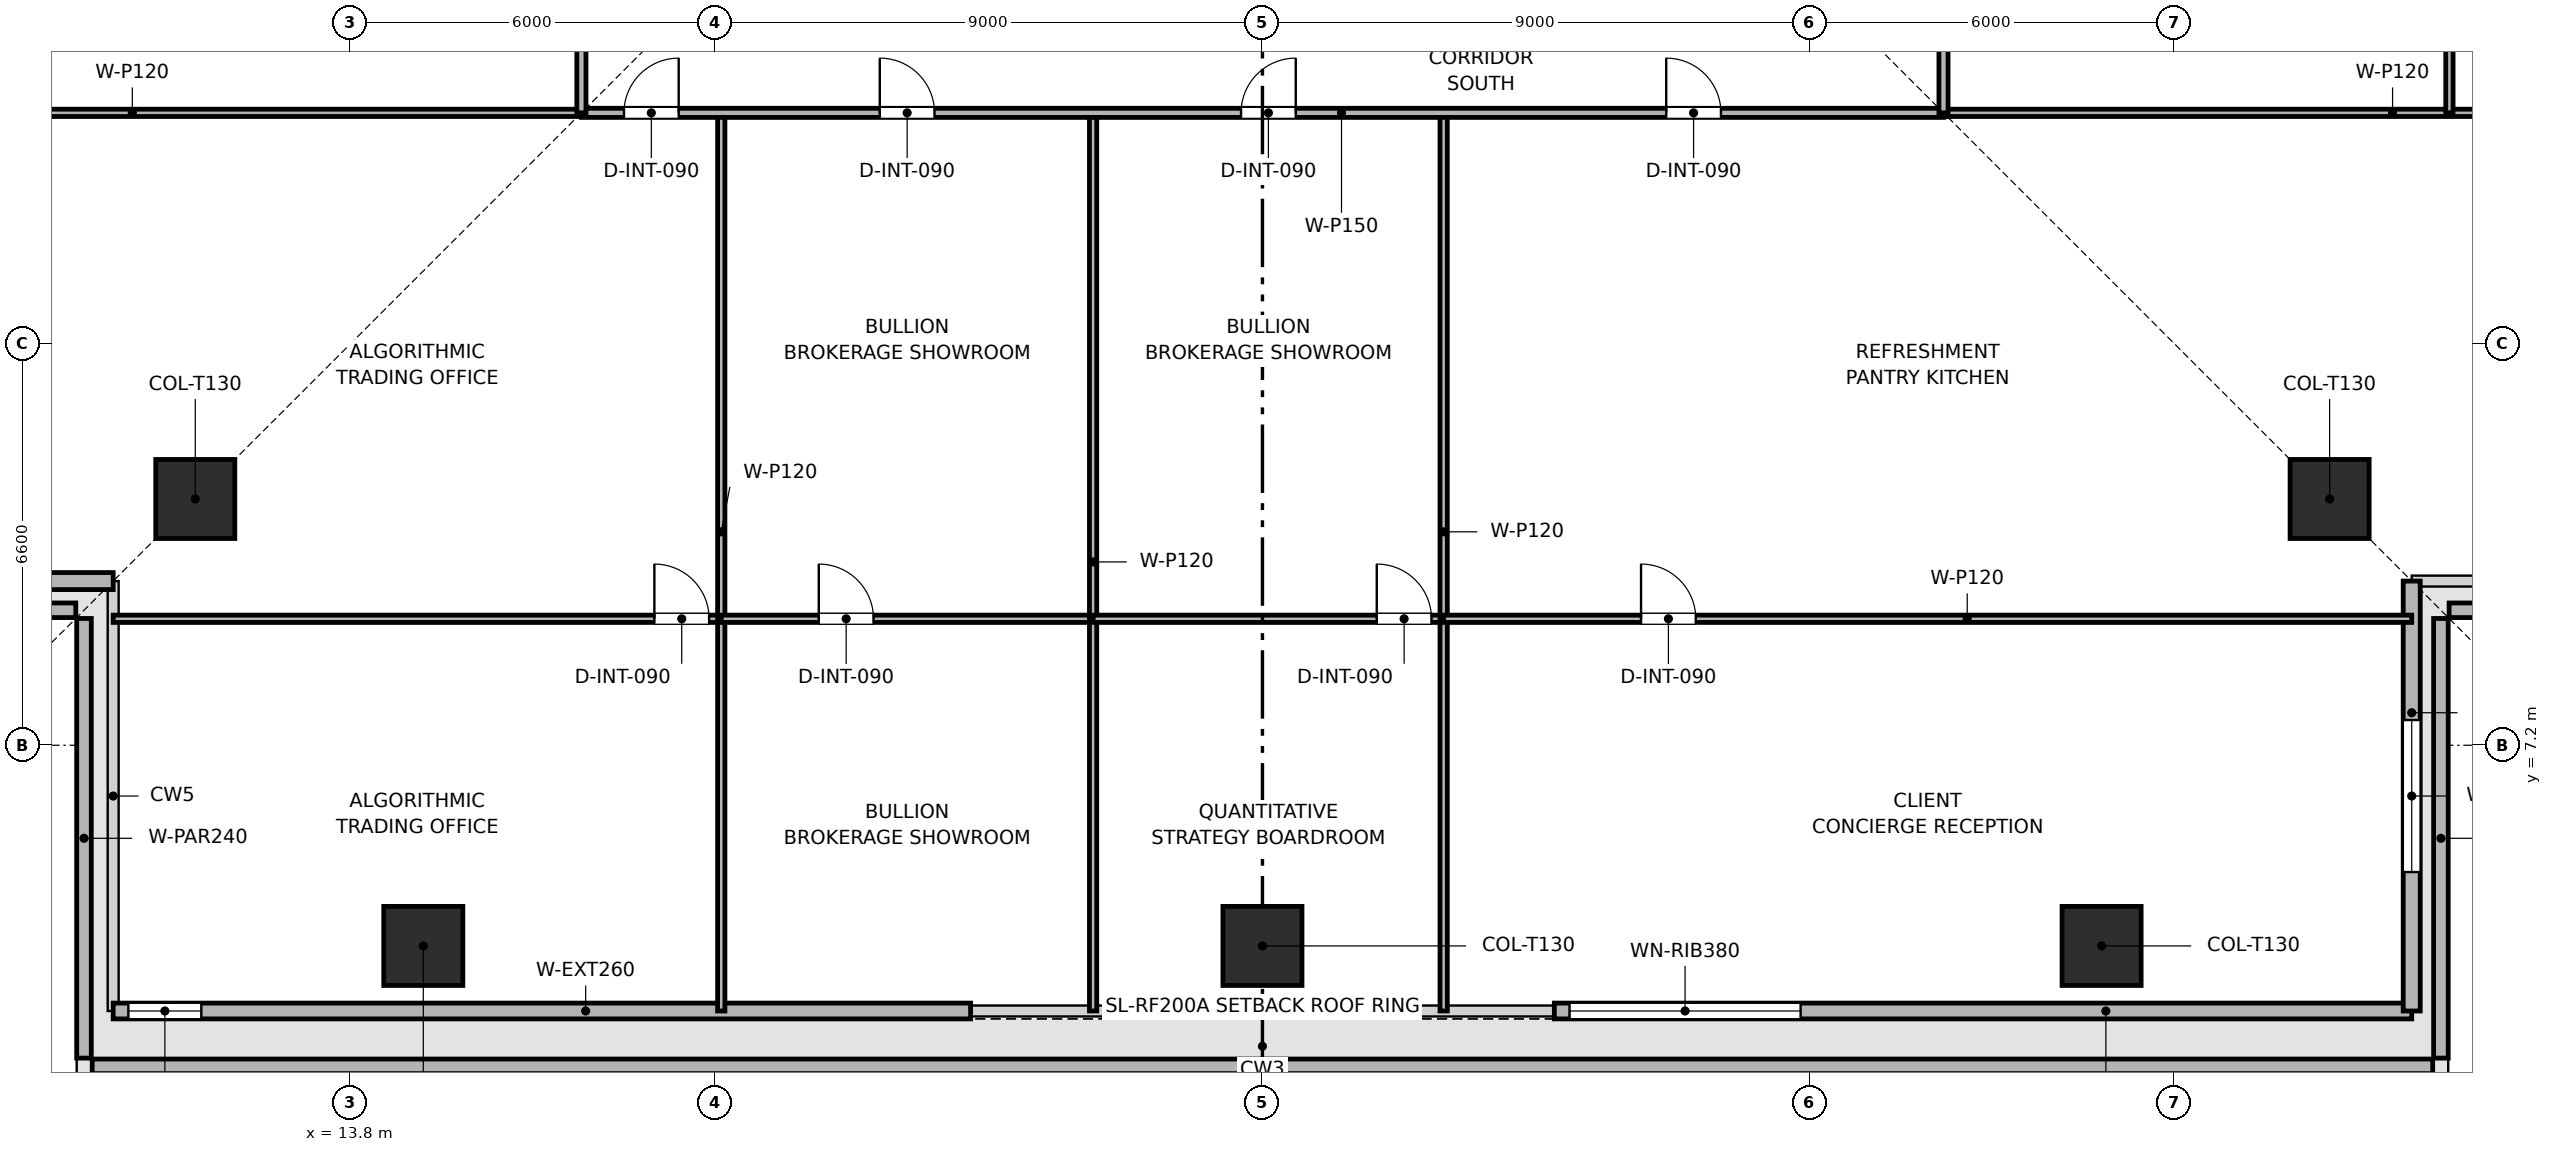
"""IFC4 building model, lengths in metres.
Left out: names, types, materials, properties, quantities, classifications, styles, units other than length and angle.
Written with IfcOpenShell. Run it as: python <this file> out.ifc"""

import sys

from ifc_helpers import new_model, si_unit, direction, frame, frame_2d, origin, origin_2d, place, context, subcontext, project, spatial, rectangle, extrude, element, fill, save


model = new_model("IFC4")
c1 = context("Model", 3, precision=1e-05, world=origin(), true_north=direction((0.0, 1.0)))
c2 = subcontext(c1, "Body", "Model", "MODEL_VIEW")
j1 = project(units=[si_unit("LENGTHUNIT", "METRE"), si_unit("PLANEANGLEUNIT", "RADIAN")], contexts=[c1])
p1 = place(None, origin())
s1 = spatial("IfcSite", under=j1, at=p1, CompositionType="ELEMENT")
p2 = place(p1, origin())
s2 = spatial("IfcBuilding", under=s1, at=p2, CompositionType="ELEMENT")
p3 = place(p2, frame((0.0, 0.0, 113.4)))
s3 = spatial("IfcBuildingStorey", under=s2, at=p3, CompositionType="ELEMENT", Elevation=113.4)
for number, where, z_axis, x_axis in (
    (1, (15.0, 3.9, 0.003), (0.0, 0.0, 1.0), (1.0, 0.0, 0.0)),
    (2, (28.8, 3.9, 0.003), (0.0, 0.0, 1.0), (1.0, 0.0, 0.0)),
    (3, (42.6, 3.9, 0.003), (0.0, 0.0, 1.0), (1.0, 0.0, 0.0)),
    (4, (11.25, 11.25, 0.003), (0.0, 0.0, 1.0), (1.0, 0.0, 0.0)),
    (5, (46.35, 11.25, 0.003), (0.0, 0.0, 1.0), (1.0, 0.0, 0.0)),
):
    element("IfcColumn", number, at=place(p3, frame(where, z_axis=z_axis, x_axis=x_axis)), inside=s3, PredefinedType="COLUMN", context=c2, shape_type="SweptSolid", body=[
        extrude(rectangle(XDim=1.3, YDim=1.3, at=origin_2d()), origin(), (0.0, 0.0, 1.0), 3.644),
    ])
p4 = place(p3, frame((9.555, 1.92, 0.0), z_axis=(0.0, 0.0, 1.0), x_axis=(1.0, 0.0, 0.0)))
e6 = element("IfcWall", 6, at=p4, inside=s3, PredefinedType="PARAPET", context=c2, shape_type="SweptSolid", body=[
    extrude(rectangle(XDim=38.49, YDim=0.24, at=frame_2d((19.245, 0.0))), origin(), (0.0, 0.0, 1.0), 1.2),
])
for number, where, z_axis, x_axis in (
    (7, (48.18, 2.055, 0.0), (0.0, 0.0, 1.0), (0.0, 1.0, 0.0)),
    (8, (48.315, 9.42, 0.0), (0.0, 0.0, 1.0), (1.0, 0.0, 0.0)),
    (9, (2.055, 9.42, 0.0), (0.0, 0.0, 1.0), (1.0, 0.0, 0.0)),
    (10, (9.42, 9.285, 0.0), (0.0, 0.0, 1.0), (0.0, -1.0, 0.0)),
):
    element("IfcWall", number, at=place(p3, frame(where, z_axis=z_axis, x_axis=x_axis)), inside=s3, PredefinedType="PARAPET", context=c2, shape_type="SweptSolid", body=[
        extrude(rectangle(XDim=7.23, YDim=0.24, at=frame_2d((3.615, 0.0))), origin(), (0.0, 0.0, 1.0), 1.2),
    ])
p5 = place(p3, frame((47.7, 2.83, 0.0), z_axis=(0.0, 0.0, 1.0), x_axis=(-1.0, 0.0, 0.0)))
e11 = element("IfcWall", 11, at=p5, inside=s3, PredefinedType="SOLIDWALL", context=c2, shape_type="SweptSolid", body=[
    extrude(rectangle(XDim=14.1, YDim=0.26, at=frame_2d((7.05, 0.0))), origin(), (0.0, 0.0, 1.0), 3.65),
])
p6 = place(p5, frame((10.05, 0.0, 0.9)))
e12 = element("IfcOpeningElement", 12, at=p6, cuts=e11, PredefinedType="OPENING", context=c2, shape_type="SweptSolid", body=[
    extrude(rectangle(XDim=3.8, YDim=1.9, at=frame_2d((1.9, 0.95))), frame((0.0, 0.14, 0.0), z_axis=(0.0, -1.0, 0.0), x_axis=(1.0, 0.0, 0.0)), (0.0, 0.0, 1.0), 0.28),
])
p7 = place(p3, frame((24.0, 2.83, 0.0), z_axis=(0.0, 0.0, 1.0), x_axis=(-1.0, 0.0, 0.0)))
e13 = element("IfcWall", 13, at=p7, inside=s3, PredefinedType="SOLIDWALL", context=c2, shape_type="SweptSolid", body=[
    extrude(rectangle(XDim=14.1, YDim=0.26, at=frame_2d((7.05, 0.0))), origin(), (0.0, 0.0, 1.0), 3.65),
])
p8 = place(p7, frame((12.65, 0.0, 0.9)))
e14 = element("IfcOpeningElement", 14, at=p8, cuts=e13, PredefinedType="OPENING", context=c2, shape_type="SweptSolid", body=[
    extrude(rectangle(XDim=1.2, YDim=2.1, at=frame_2d((0.6, 1.05))), frame((0.0, 0.14, 0.0), z_axis=(0.0, -1.0, 0.0), x_axis=(1.0, 0.0, 0.0)), (0.0, 0.0, 1.0), 0.28),
])
p9 = place(p3, frame((9.9, 9.9, 0.0), z_axis=(0.0, 0.0, 1.0), x_axis=(-1.0, 0.0, 0.0)))
e15 = element("IfcWall", 15, at=p9, inside=s3, PredefinedType="SOLIDWALL", context=c2, shape_type="SweptSolid", body=[
    extrude(rectangle(XDim=7.07, YDim=0.28, at=frame_2d((3.535, 0.0))), origin(), (0.0, 0.0, 1.0), 3.65),
])
p10 = place(p9, frame((2.285, 0.0, 0.9)))
e16 = element("IfcOpeningElement", 16, at=p10, cuts=e15, PredefinedType="OPENING", context=c2, shape_type="SweptSolid", body=[
    extrude(rectangle(XDim=2.5, YDim=1.9, at=frame_2d((1.25, 0.95))), frame((0.0, 0.15, 0.0), z_axis=(0.0, -1.0, 0.0), x_axis=(1.0, 0.0, 0.0)), (0.0, 0.0, 1.0), 0.3),
])
p11 = place(p3, frame((47.7, 9.9, 0.0), z_axis=(0.0, 0.0, 1.0), x_axis=(0.0, -1.0, 0.0)))
e17 = element("IfcWall", 17, at=p11, inside=s3, PredefinedType="SOLIDWALL", context=c2, shape_type="SweptSolid", body=[
    extrude(rectangle(XDim=7.07, YDim=0.28, at=frame_2d((3.535, 0.0))), origin(), (0.0, 0.0, 1.0), 3.65),
])
p12 = place(p11, frame((2.285, 0.0, 0.9)))
e18 = element("IfcOpeningElement", 18, at=p12, cuts=e17, PredefinedType="OPENING", context=c2, shape_type="SweptSolid", body=[
    extrude(rectangle(XDim=2.5, YDim=1.9, at=frame_2d((1.25, 0.95))), frame((0.0, 0.15, 0.0), z_axis=(0.0, -1.0, 0.0), x_axis=(1.0, 0.0, 0.0)), (0.0, 0.0, 1.0), 0.3),
])
p13 = place(p3, frame((9.9, 9.28, 0.0), z_axis=(0.0, 0.0, 1.0), x_axis=(1.0, 0.0, 0.0)))
e19 = element("IfcWall", 19, at=p13, inside=s3, PredefinedType="PARTITIONING", context=c2, shape_type="SweptSolid", body=[
    extrude(rectangle(XDim=10.0, YDim=0.12, at=frame_2d((5.0, 0.0))), origin(), (0.0, 0.0, 1.0), 3.035),
])
p14 = place(p13, frame((8.9, 0.0, 0.0)))
e20 = element("IfcOpeningElement", 20, at=p14, cuts=e19, PredefinedType="OPENING", context=c2, shape_type="SweptSolid", body=[
    extrude(rectangle(XDim=0.9, YDim=2.1, at=frame_2d((0.45, 1.05))), frame((0.0, 0.07, 0.0), z_axis=(0.0, -1.0, 0.0), x_axis=(1.0, 0.0, 0.0)), (0.0, 0.0, 1.0), 0.14),
])
p15 = place(p3, frame((19.9, 2.83, 0.0), z_axis=(0.0, 0.0, 1.0), x_axis=(0.0, 1.0, 0.0)))
e21 = element("IfcWall", 21, at=p15, inside=s3, PredefinedType="PARTITIONING", context=c2, shape_type="SweptSolid", body=[
    extrude(rectangle(XDim=14.77, YDim=0.12, at=frame_2d((7.385, 0.0))), origin(), (0.0, 0.0, 1.0), 3.035),
])
p16 = place(p3, frame((19.9, 9.28, 0.0), z_axis=(0.0, 0.0, 1.0), x_axis=(1.0, 0.0, 0.0)))
e22 = element("IfcWall", 22, at=p16, inside=s3, PredefinedType="PARTITIONING", context=c2, shape_type="SweptSolid", body=[
    extrude(rectangle(XDim=6.115, YDim=0.12, at=frame_2d((3.058, 0.0))), origin(), (0.0, 0.0, 1.0), 3.185),
])
p17 = place(p16, frame((1.604, 0.0, 0.0)))
e23 = element("IfcOpeningElement", 23, at=p17, cuts=e22, PredefinedType="OPENING", context=c2, shape_type="SweptSolid", body=[
    extrude(rectangle(XDim=0.9, YDim=2.1, at=frame_2d((0.45, 1.05))), frame((0.0, 0.07, 0.0), z_axis=(0.0, -1.0, 0.0), x_axis=(1.0, 0.0, 0.0)), (0.0, 0.0, 1.0), 0.14),
])
p18 = place(p3, frame((26.015, 2.83, 0.0), z_axis=(0.0, 0.0, 1.0), x_axis=(0.0, 1.0, 0.0)))
e24 = element("IfcWall", 24, at=p18, inside=s3, PredefinedType="PARTITIONING", context=c2, shape_type="SweptSolid", body=[
    extrude(rectangle(XDim=14.77, YDim=0.12, at=frame_2d((7.385, 0.0))), origin(), (0.0, 0.0, 1.0), 3.035),
])
p19 = place(p3, frame((26.015, 9.28, 0.0), z_axis=(0.0, 0.0, 1.0), x_axis=(1.0, 0.0, 0.0)))
e25 = element("IfcWall", 25, at=p19, inside=s3, PredefinedType="PARTITIONING", context=c2, shape_type="SweptSolid", body=[
    extrude(rectangle(XDim=5.765, YDim=0.12, at=frame_2d((2.883, 0.0))), origin(), (0.0, 0.0, 1.0), 3.185),
])
p20 = place(p19, frame((4.665, 0.0, 0.0)))
e26 = element("IfcOpeningElement", 26, at=p20, cuts=e25, PredefinedType="OPENING", context=c2, shape_type="SweptSolid", body=[
    extrude(rectangle(XDim=0.9, YDim=2.1, at=frame_2d((0.45, 1.05))), frame((0.0, 0.07, 0.0), z_axis=(0.0, -1.0, 0.0), x_axis=(1.0, 0.0, 0.0)), (0.0, 0.0, 1.0), 0.14),
])
p21 = place(p3, frame((31.78, 2.83, 0.0), z_axis=(0.0, 0.0, 1.0), x_axis=(0.0, 1.0, 0.0)))
e27 = element("IfcWall", 27, at=p21, inside=s3, PredefinedType="PARTITIONING", context=c2, shape_type="SweptSolid", body=[
    extrude(rectangle(XDim=14.77, YDim=0.12, at=frame_2d((7.385, 0.0))), origin(), (0.0, 0.0, 1.0), 3.035),
])
p22 = place(p3, frame((31.78, 9.28, 0.0), z_axis=(0.0, 0.0, 1.0), x_axis=(1.0, 0.0, 0.0)))
e28 = element("IfcWall", 28, at=p22, inside=s3, PredefinedType="PARTITIONING", context=c2, shape_type="SweptSolid", body=[
    extrude(rectangle(XDim=15.92, YDim=0.12, at=frame_2d((7.96, 0.0))), origin(), (0.0, 0.0, 1.0), 3.035),
])
p23 = place(p22, frame((3.246, 0.0, 0.0)))
e29 = element("IfcOpeningElement", 29, at=p23, cuts=e28, PredefinedType="OPENING", context=c2, shape_type="SweptSolid", body=[
    extrude(rectangle(XDim=0.9, YDim=2.1, at=frame_2d((0.45, 1.05))), frame((0.0, 0.07, 0.0), z_axis=(0.0, -1.0, 0.0), x_axis=(1.0, 0.0, 0.0)), (0.0, 0.0, 1.0), 0.14),
])
for number, where, z_axis, x_axis in (
    (30, (2.83, 17.6, 0.0), (0.0, 0.0, 1.0), (1.0, 0.0, 0.0)),
    (31, (40.0, 17.6, 0.0), (0.0, 0.0, 1.0), (1.0, 0.0, 0.0)),
):
    element("IfcWall", number, at=place(p3, frame(where, z_axis=z_axis, x_axis=x_axis)), inside=s3, PredefinedType="PARTITIONING", context=c2, shape_type="SweptSolid", body=[
        extrude(rectangle(XDim=14.77, YDim=0.12, at=frame_2d((7.385, 0.0))), origin(), (0.0, 0.0, 1.0), 3.035),
    ])
p24 = place(p3, frame((48.32, 17.6, 0.0), z_axis=(0.0, 0.0, 1.0), x_axis=(0.0, 1.0, 0.0)))
e32 = element("IfcWall", 32, at=p24, inside=s3, PredefinedType="PARTITIONING", context=c2, shape_type="SweptSolid", body=[
    extrude(rectangle(XDim=22.4, YDim=0.12, at=frame_2d((11.2, 0.0))), origin(), (0.0, 0.0, 1.0), 3.185),
])
p25 = place(p24, frame((17.783, 0.0, 0.0)))
e33 = element("IfcOpeningElement", 33, at=p25, cuts=e32, PredefinedType="OPENING", context=c2, shape_type="SweptSolid", body=[
    extrude(rectangle(XDim=0.9, YDim=2.1, at=frame_2d((0.45, 1.05))), frame((0.0, 0.07, 0.0), z_axis=(0.0, -1.0, 0.0), x_axis=(1.0, 0.0, 0.0)), (0.0, 0.0, 1.0), 0.14),
])
p26 = place(p3, frame((17.6, 17.6, 0.0), z_axis=(0.0, 0.0, 1.0), x_axis=(1.0, 0.0, 0.0)))
e34 = element("IfcWall", 34, at=p26, inside=s3, PredefinedType="PARTITIONING", context=c2, shape_type="SweptSolid", body=[
    extrude(rectangle(XDim=22.4, YDim=0.15, at=frame_2d((11.2, 0.0))), origin(), (0.0, 0.0, 1.0), 3.185),
])
p27 = place(p26, frame((0.7, 0.0, 0.0)))
e35 = element("IfcOpeningElement", 35, at=p27, cuts=e34, PredefinedType="OPENING", context=c2, shape_type="SweptSolid", body=[
    extrude(rectangle(XDim=0.9, YDim=2.1, at=frame_2d((0.45, 1.05))), frame((0.0, 0.085, 0.0), z_axis=(0.0, -1.0, 0.0), x_axis=(1.0, 0.0, 0.0)), (0.0, 0.0, 1.0), 0.17),
])
p28 = place(p26, frame((4.907, 0.0, 0.0)))
e36 = element("IfcOpeningElement", 36, at=p28, cuts=e34, PredefinedType="OPENING", context=c2, shape_type="SweptSolid", body=[
    extrude(rectangle(XDim=0.9, YDim=2.1, at=frame_2d((0.45, 1.05))), frame((0.0, 0.085, 0.0), z_axis=(0.0, -1.0, 0.0), x_axis=(1.0, 0.0, 0.0)), (0.0, 0.0, 1.0), 0.17),
])
p29 = place(p26, frame((10.848, 0.0, 0.0)))
e37 = element("IfcOpeningElement", 37, at=p29, cuts=e34, PredefinedType="OPENING", context=c2, shape_type="SweptSolid", body=[
    extrude(rectangle(XDim=0.9, YDim=2.1, at=frame_2d((0.45, 1.05))), frame((0.0, 0.085, 0.0), z_axis=(0.0, -1.0, 0.0), x_axis=(1.0, 0.0, 0.0)), (0.0, 0.0, 1.0), 0.17),
])
p30 = place(p26, frame((17.84, 0.0, 0.0)))
e38 = element("IfcOpeningElement", 38, at=p30, cuts=e34, PredefinedType="OPENING", context=c2, shape_type="SweptSolid", body=[
    extrude(rectangle(XDim=0.9, YDim=2.1, at=frame_2d((0.45, 1.05))), frame((0.0, 0.085, 0.0), z_axis=(0.0, -1.0, 0.0), x_axis=(1.0, 0.0, 0.0)), (0.0, 0.0, 1.0), 0.17),
])
p31 = place(p3, frame((17.6, 17.6, 0.0), z_axis=(0.0, 0.0, 1.0), x_axis=(0.0, 1.0, 0.0)))
e39 = element("IfcWall", 39, at=p31, inside=s3, PredefinedType="PARTITIONING", context=c2, shape_type="SweptSolid", body=[
    extrude(rectangle(XDim=22.4, YDim=0.15, at=frame_2d((11.2, 0.0))), origin(), (0.0, 0.0, 1.0), 3.185),
])
p32 = place(p31, frame((4.616, 0.0, 0.0)))
e40 = element("IfcOpeningElement", 40, at=p32, cuts=e39, PredefinedType="OPENING", context=c2, shape_type="SweptSolid", body=[
    extrude(rectangle(XDim=0.9, YDim=2.1, at=frame_2d((0.45, 1.05))), frame((0.0, 0.085, 0.0), z_axis=(0.0, -1.0, 0.0), x_axis=(1.0, 0.0, 0.0)), (0.0, 0.0, 1.0), 0.17),
])
p33 = place(p31, frame((15.816, 0.0, 0.0)))
e41 = element("IfcOpeningElement", 41, at=p33, cuts=e39, PredefinedType="OPENING", context=c2, shape_type="SweptSolid", body=[
    extrude(rectangle(XDim=0.9, YDim=2.1, at=frame_2d((0.45, 1.05))), frame((0.0, 0.085, 0.0), z_axis=(0.0, -1.0, 0.0), x_axis=(1.0, 0.0, 0.0)), (0.0, 0.0, 1.0), 0.17),
])
p34 = place(p3, frame((40.0, 17.6, 0.0), z_axis=(0.0, 0.0, 1.0), x_axis=(0.0, 1.0, 0.0)))
e42 = element("IfcWall", 42, at=p34, inside=s3, PredefinedType="PARTITIONING", context=c2, shape_type="SweptSolid", body=[
    extrude(rectangle(XDim=22.4, YDim=0.15, at=frame_2d((11.2, 0.0))), origin(), (0.0, 0.0, 1.0), 3.185),
])
p35 = place(p34, frame((10.75, 0.0, 0.0)))
e43 = element("IfcOpeningElement", 43, at=p35, cuts=e42, PredefinedType="OPENING", context=c2, shape_type="SweptSolid", body=[
    extrude(rectangle(XDim=0.9, YDim=2.1, at=frame_2d((0.45, 1.05))), frame((0.0, 0.085, 0.0), z_axis=(0.0, -1.0, 0.0), x_axis=(1.0, 0.0, 0.0)), (0.0, 0.0, 1.0), 0.17),
])
p36 = place(p6, origin())
e44 = element("IfcWindow", 44, at=p36, inside=s3, PartitioningType="SINGLE_PANEL", PredefinedType="WINDOW", context=c2, shape_type="SweptSolid", body=[
    extrude(rectangle(XDim=3.8, YDim=1.9, at=frame_2d((1.9, 0.95))), frame((0.0, 0.03, 0.0), z_axis=(0.0, -1.0, 0.0), x_axis=(1.0, 0.0, 0.0)), (0.0, 0.0, 1.0), 0.06),
])
fill(e12, e44)
p37 = place(p8, origin())
e45 = element("IfcWindow", 45, at=p37, inside=s3, PartitioningType="SINGLE_PANEL", PredefinedType="WINDOW", context=c2, shape_type="SweptSolid", body=[
    extrude(rectangle(XDim=1.2, YDim=2.1, at=frame_2d((0.6, 1.05))), frame((0.0, 0.03, 0.0), z_axis=(0.0, -1.0, 0.0), x_axis=(1.0, 0.0, 0.0)), (0.0, 0.0, 1.0), 0.06),
])
fill(e14, e45)
p38 = place(p12, origin())
e46 = element("IfcWindow", 46, at=p38, inside=s3, PartitioningType="SINGLE_PANEL", PredefinedType="WINDOW", context=c2, shape_type="SweptSolid", body=[
    extrude(rectangle(XDim=2.5, YDim=1.9, at=frame_2d((1.25, 0.95))), frame((0.0, 0.03, 0.0), z_axis=(0.0, -1.0, 0.0), x_axis=(1.0, 0.0, 0.0)), (0.0, 0.0, 1.0), 0.06),
])
fill(e18, e46)
p39 = place(p14, origin())
e47 = element("IfcDoor", 47, at=p39, inside=s3, OperationType="SINGLE_SWING_LEFT", PredefinedType="DOOR", context=c2, shape_type="SweptSolid", body=[
    extrude(rectangle(XDim=0.9, YDim=2.1, at=frame_2d((0.45, 1.05))), frame((0.0, 0.025, 0.0), z_axis=(0.0, -1.0, 0.0), x_axis=(1.0, 0.0, 0.0)), (0.0, 0.0, 1.0), 0.05),
])
fill(e20, e47)
p40 = place(p17, origin())
e48 = element("IfcDoor", 48, at=p40, inside=s3, OperationType="SINGLE_SWING_LEFT", PredefinedType="DOOR", context=c2, shape_type="SweptSolid", body=[
    extrude(rectangle(XDim=0.9, YDim=2.1, at=frame_2d((0.45, 1.05))), frame((0.0, 0.025, 0.0), z_axis=(0.0, -1.0, 0.0), x_axis=(1.0, 0.0, 0.0)), (0.0, 0.0, 1.0), 0.05),
])
fill(e23, e48)
p41 = place(p20, origin())
e49 = element("IfcDoor", 49, at=p41, inside=s3, OperationType="SINGLE_SWING_LEFT", PredefinedType="DOOR", context=c2, shape_type="SweptSolid", body=[
    extrude(rectangle(XDim=0.9, YDim=2.1, at=frame_2d((0.45, 1.05))), frame((0.0, 0.025, 0.0), z_axis=(0.0, -1.0, 0.0), x_axis=(1.0, 0.0, 0.0)), (0.0, 0.0, 1.0), 0.05),
])
fill(e26, e49)
p42 = place(p23, origin())
e50 = element("IfcDoor", 50, at=p42, inside=s3, OperationType="SINGLE_SWING_LEFT", PredefinedType="DOOR", context=c2, shape_type="SweptSolid", body=[
    extrude(rectangle(XDim=0.9, YDim=2.1, at=frame_2d((0.45, 1.05))), frame((0.0, 0.025, 0.0), z_axis=(0.0, -1.0, 0.0), x_axis=(1.0, 0.0, 0.0)), (0.0, 0.0, 1.0), 0.05),
])
fill(e29, e50)
p43 = place(p27, origin())
e51 = element("IfcDoor", 51, at=p43, inside=s3, OperationType="SINGLE_SWING_RIGHT", PredefinedType="DOOR", context=c2, shape_type="SweptSolid", body=[
    extrude(rectangle(XDim=0.9, YDim=2.1, at=frame_2d((0.45, 1.05))), frame((0.0, 0.025, 0.0), z_axis=(0.0, -1.0, 0.0), x_axis=(1.0, 0.0, 0.0)), (0.0, 0.0, 1.0), 0.05),
])
fill(e35, e51)
p44 = place(p28, origin())
e52 = element("IfcDoor", 52, at=p44, inside=s3, OperationType="SINGLE_SWING_LEFT", PredefinedType="DOOR", context=c2, shape_type="SweptSolid", body=[
    extrude(rectangle(XDim=0.9, YDim=2.1, at=frame_2d((0.45, 1.05))), frame((0.0, 0.025, 0.0), z_axis=(0.0, -1.0, 0.0), x_axis=(1.0, 0.0, 0.0)), (0.0, 0.0, 1.0), 0.05),
])
fill(e36, e52)
p45 = place(p29, origin())
e53 = element("IfcDoor", 53, at=p45, inside=s3, OperationType="SINGLE_SWING_RIGHT", PredefinedType="DOOR", context=c2, shape_type="SweptSolid", body=[
    extrude(rectangle(XDim=0.9, YDim=2.1, at=frame_2d((0.45, 1.05))), frame((0.0, 0.025, 0.0), z_axis=(0.0, -1.0, 0.0), x_axis=(1.0, 0.0, 0.0)), (0.0, 0.0, 1.0), 0.05),
])
fill(e37, e53)
p46 = place(p30, origin())
e54 = element("IfcDoor", 54, at=p46, inside=s3, OperationType="SINGLE_SWING_LEFT", PredefinedType="DOOR", context=c2, shape_type="SweptSolid", body=[
    extrude(rectangle(XDim=0.9, YDim=2.1, at=frame_2d((0.45, 1.05))), frame((0.0, 0.025, 0.0), z_axis=(0.0, -1.0, 0.0), x_axis=(1.0, 0.0, 0.0)), (0.0, 0.0, 1.0), 0.05),
])
fill(e38, e54)
save(model, sys.argv[1])
